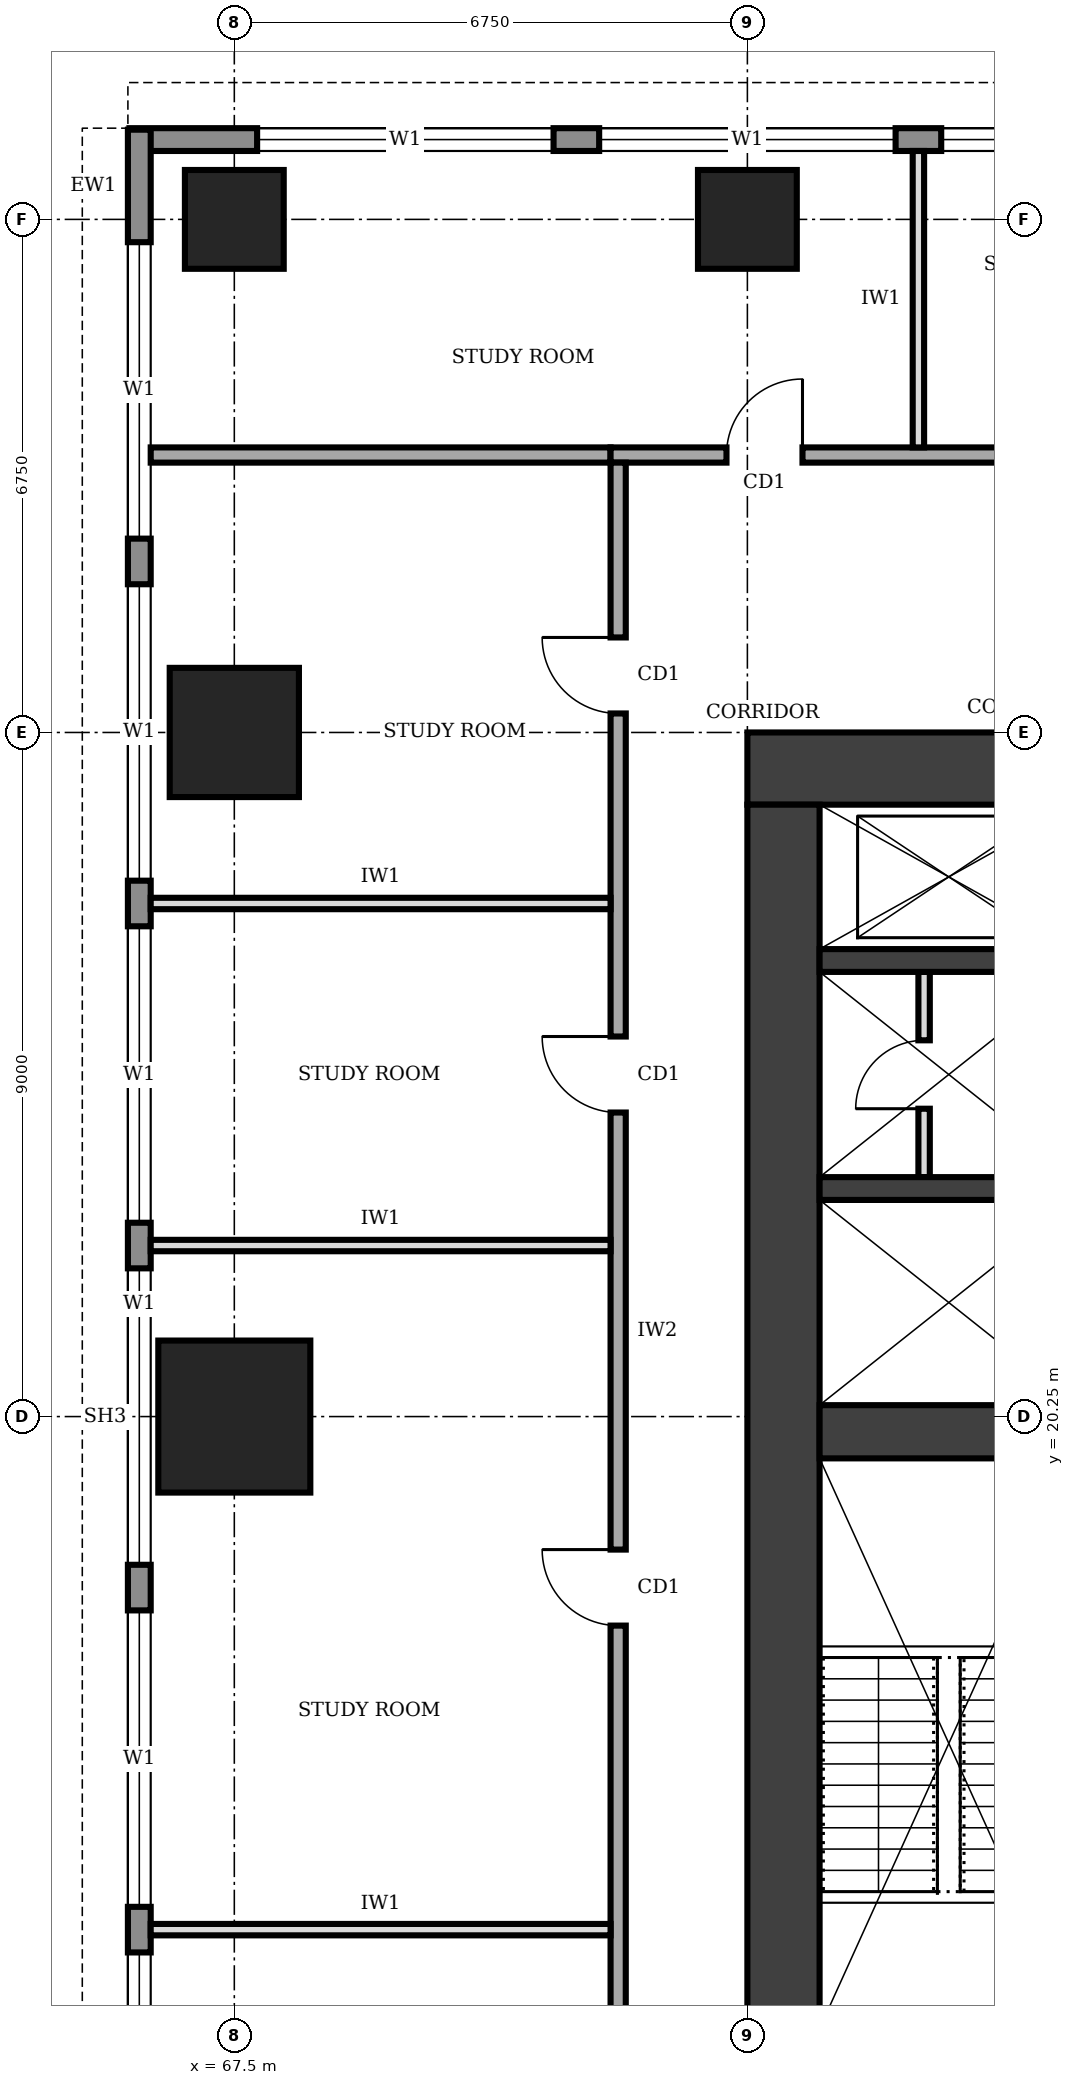
"""IFC4 building model, lengths in metres.
Left out: names, types, materials, properties, quantities, classifications, styles, units other than length and angle.
Written with IfcOpenShell. Run it as: python <this file> out.ifc"""

import sys

from ifc_helpers import new_model, si_unit, direction, frame, frame_2d, origin, origin_2d, place, context, subcontext, project, spatial, rectangle, extrude, element, fill, save


model = new_model("IFC4")
c1 = context("Model", 3, precision=1e-05, world=origin(), true_north=direction((0.0, 1.0)))
c2 = subcontext(c1, "Body", "Model", "MODEL_VIEW")
j1 = project(units=[si_unit("LENGTHUNIT", "METRE"), si_unit("PLANEANGLEUNIT", "RADIAN")], contexts=[c1])
p1 = place(None, origin())
s1 = spatial("IfcSite", under=j1, at=p1, CompositionType="ELEMENT")
p2 = place(p1, origin())
s2 = spatial("IfcBuilding", under=s1, at=p2, CompositionType="ELEMENT")
p3 = place(p2, frame((0.0, 0.0, 225.0)))
s3 = spatial("IfcBuildingStorey", under=s2, at=p3, CompositionType="ELEMENT", Elevation=225.0)
p4 = place(p3, frame((87.75, 28.775, 0.0), z_axis=(0.0, 0.0, 1.0), x_axis=(-1.0, 0.0, 0.0)))
e1 = element("IfcWall", 1, at=p4, inside=s3, PredefinedType="SHEAR", context=c2, shape_type="SweptSolid", body=[
    extrude(rectangle(XDim=13.5, YDim=0.95, at=frame_2d((6.75, 0.0))), origin(), (0.0, 0.0, 1.0), 4.0),
])
p5 = place(p4, frame((4.75, 0.0, 0.0)))
e2 = element("IfcOpeningElement", 2, at=p5, cuts=e1, PredefinedType="OPENING", context=c2, shape_type="SweptSolid", body=[
    extrude(rectangle(XDim=1.8, YDim=2.1, at=frame_2d((0.9, 1.05))), frame((0.0, 0.485, 0.0), z_axis=(0.0, -1.0, 0.0), x_axis=(1.0, 0.0, 0.0)), (0.0, 0.0, 1.0), 0.97),
])
p6 = place(p3, frame((74.725, 28.3, 0.0), z_axis=(0.0, 0.0, 1.0), x_axis=(0.0, -1.0, 0.0)))
e3 = element("IfcWall", 3, at=p6, inside=s3, PredefinedType="SHEAR", context=c2, shape_type="SweptSolid", body=[
    extrude(rectangle(XDim=16.1, YDim=0.95, at=frame_2d((8.05, 0.0))), origin(), (0.0, 0.0, 1.0), 4.0),
])
p7 = place(p3, frame((75.2, 20.05, 0.0), z_axis=(0.0, 0.0, 1.0), x_axis=(1.0, 0.0, 0.0)))
e4 = element("IfcWall", 4, at=p7, inside=s3, PredefinedType="SHEAR", context=c2, shape_type="SweptSolid", body=[
    extrude(rectangle(XDim=3.4, YDim=0.7, at=frame_2d((1.7, 0.0))), origin(), (0.0, 0.0, 1.0), 4.0),
])
for number, where, z_axis, x_axis in (
    (5, (75.2, 23.25, 0.0), (0.0, 0.0, 1.0), (1.0, 0.0, 0.0)),
    (6, (75.2, 26.25, 0.0), (0.0, 0.0, 1.0), (1.0, 0.0, 0.0)),
):
    element("IfcWall", number, at=place(p3, frame(where, z_axis=z_axis, x_axis=x_axis)), inside=s3, PredefinedType="SHEAR", context=c2, shape_type="SweptSolid", body=[
        extrude(rectangle(XDim=3.4, YDim=0.3, at=frame_2d((1.7, 0.0))), origin(), (0.0, 0.0, 1.0), 4.0),
    ])
p8 = place(p3, frame((67.5, 20.25, 0.0), z_axis=(0.0, 0.0, 1.0), x_axis=(1.0, 0.0, 0.0)))
e7 = element("IfcColumn", 7, at=p8, inside=s3, PredefinedType="COLUMN", context=c2, shape_type="SweptSolid", body=[
    extrude(rectangle(XDim=2.0, YDim=2.0, at=origin_2d()), origin(), (0.0, 0.0, 1.0), 4.0),
])
p9 = place(p3, frame((67.5, 29.25, 0.0), z_axis=(0.0, 0.0, 1.0), x_axis=(1.0, 0.0, 0.0)))
e8 = element("IfcColumn", 8, at=p9, inside=s3, PredefinedType="COLUMN", context=c2, shape_type="SweptSolid", body=[
    extrude(rectangle(XDim=1.7, YDim=1.7, at=origin_2d()), origin(), (0.0, 0.0, 1.0), 4.0),
])
for number, where, z_axis, x_axis in (
    (9, (67.5, 36.0, 0.0), (0.0, 0.0, 1.0), (1.0, 0.0, 0.0)),
    (10, (74.25, 36.0, 0.0), (0.0, 0.0, 1.0), (1.0, 0.0, 0.0)),
):
    element("IfcColumn", number, at=place(p3, frame(where, z_axis=z_axis, x_axis=x_axis)), inside=s3, PredefinedType="COLUMN", context=c2, shape_type="SweptSolid", body=[
        extrude(rectangle(XDim=1.3, YDim=1.3, at=origin_2d()), origin(), (0.0, 0.0, 1.0), 4.0),
    ])
p10 = place(p3, frame((96.03, 37.05, 0.0), z_axis=(0.0, 0.0, 1.0), x_axis=(-1.0, 0.0, 0.0)))
e11 = element("IfcWall", 11, at=p10, inside=s3, PredefinedType="STANDARD", context=c2, shape_type="SweptSolid", body=[
    extrude(rectangle(XDim=29.91, YDim=0.3, at=frame_2d((14.955, 0.0))), origin(), (0.0, 0.0, 1.0), 3.75),
])
p11 = place(p10, frame((24.33, 0.0, 0.9)))
e12 = element("IfcOpeningElement", 12, at=p11, cuts=e11, PredefinedType="OPENING", context=c2, shape_type="SweptSolid", body=[
    extrude(rectangle(XDim=3.9, YDim=2.2, at=frame_2d((1.95, 1.1))), frame((0.0, 0.16, 0.0), z_axis=(0.0, -1.0, 0.0), x_axis=(1.0, 0.0, 0.0)), (0.0, 0.0, 1.0), 0.32),
])
p12 = place(p10, frame((19.83, 0.0, 0.9)))
e13 = element("IfcOpeningElement", 13, at=p12, cuts=e11, PredefinedType="OPENING", context=c2, shape_type="SweptSolid", body=[
    extrude(rectangle(XDim=3.9, YDim=2.2, at=frame_2d((1.95, 1.1))), frame((0.0, 0.16, 0.0), z_axis=(0.0, -1.0, 0.0), x_axis=(1.0, 0.0, 0.0)), (0.0, 0.0, 1.0), 0.32),
])
p13 = place(p10, frame((15.33, 0.0, 0.9)))
e14 = element("IfcOpeningElement", 14, at=p13, cuts=e11, PredefinedType="OPENING", context=c2, shape_type="SweptSolid", body=[
    extrude(rectangle(XDim=3.9, YDim=2.2, at=frame_2d((1.95, 1.1))), frame((0.0, 0.16, 0.0), z_axis=(0.0, -1.0, 0.0), x_axis=(1.0, 0.0, 0.0)), (0.0, 0.0, 1.0), 0.32),
])
p14 = place(p10, frame((10.83, 0.0, 0.9)))
e15 = element("IfcOpeningElement", 15, at=p14, cuts=e11, PredefinedType="OPENING", context=c2, shape_type="SweptSolid", body=[
    extrude(rectangle(XDim=3.9, YDim=2.2, at=frame_2d((1.95, 1.1))), frame((0.0, 0.16, 0.0), z_axis=(0.0, -1.0, 0.0), x_axis=(1.0, 0.0, 0.0)), (0.0, 0.0, 1.0), 0.32),
])
p15 = place(p10, frame((6.33, 0.0, 0.9)))
e16 = element("IfcOpeningElement", 16, at=p15, cuts=e11, PredefinedType="OPENING", context=c2, shape_type="SweptSolid", body=[
    extrude(rectangle(XDim=3.9, YDim=2.2, at=frame_2d((1.95, 1.1))), frame((0.0, 0.16, 0.0), z_axis=(0.0, -1.0, 0.0), x_axis=(1.0, 0.0, 0.0)), (0.0, 0.0, 1.0), 0.32),
])
p16 = place(p10, frame((1.83, 0.0, 0.9)))
e17 = element("IfcOpeningElement", 17, at=p16, cuts=e11, PredefinedType="OPENING", context=c2, shape_type="SweptSolid", body=[
    extrude(rectangle(XDim=3.9, YDim=2.2, at=frame_2d((1.95, 1.1))), frame((0.0, 0.16, 0.0), z_axis=(0.0, -1.0, 0.0), x_axis=(1.0, 0.0, 0.0)), (0.0, 0.0, 1.0), 0.32),
])
p17 = place(p3, frame((66.25, 37.18, 0.0), z_axis=(0.0, 0.0, 1.0), x_axis=(0.0, -1.0, 0.0)))
e18 = element("IfcWall", 18, at=p17, inside=s3, PredefinedType="STANDARD", context=c2, shape_type="SweptSolid", body=[
    extrude(rectangle(XDim=33.86, YDim=0.3, at=frame_2d((16.93, 0.0))), origin(), (0.0, 0.0, 1.0), 3.75),
])
p18 = place(p17, frame((28.48, 0.0, 0.9)))
e19 = element("IfcOpeningElement", 19, at=p18, cuts=e18, PredefinedType="OPENING", context=c2, shape_type="SweptSolid", body=[
    extrude(rectangle(XDim=3.9, YDim=2.2, at=frame_2d((1.95, 1.1))), frame((0.0, 0.16, 0.0), z_axis=(0.0, -1.0, 0.0), x_axis=(1.0, 0.0, 0.0)), (0.0, 0.0, 1.0), 0.32),
])
p19 = place(p17, frame((23.98, 0.0, 0.9)))
e20 = element("IfcOpeningElement", 20, at=p19, cuts=e18, PredefinedType="OPENING", context=c2, shape_type="SweptSolid", body=[
    extrude(rectangle(XDim=3.9, YDim=2.2, at=frame_2d((1.95, 1.1))), frame((0.0, 0.16, 0.0), z_axis=(0.0, -1.0, 0.0), x_axis=(1.0, 0.0, 0.0)), (0.0, 0.0, 1.0), 0.32),
])
p20 = place(p17, frame((19.48, 0.0, 0.9)))
e21 = element("IfcOpeningElement", 21, at=p20, cuts=e18, PredefinedType="OPENING", context=c2, shape_type="SweptSolid", body=[
    extrude(rectangle(XDim=3.9, YDim=2.2, at=frame_2d((1.95, 1.1))), frame((0.0, 0.16, 0.0), z_axis=(0.0, -1.0, 0.0), x_axis=(1.0, 0.0, 0.0)), (0.0, 0.0, 1.0), 0.32),
])
p21 = place(p17, frame((14.98, 0.0, 0.9)))
e22 = element("IfcOpeningElement", 22, at=p21, cuts=e18, PredefinedType="OPENING", context=c2, shape_type="SweptSolid", body=[
    extrude(rectangle(XDim=3.9, YDim=2.2, at=frame_2d((1.95, 1.1))), frame((0.0, 0.16, 0.0), z_axis=(0.0, -1.0, 0.0), x_axis=(1.0, 0.0, 0.0)), (0.0, 0.0, 1.0), 0.32),
])
p22 = place(p17, frame((10.48, 0.0, 0.9)))
e23 = element("IfcOpeningElement", 23, at=p22, cuts=e18, PredefinedType="OPENING", context=c2, shape_type="SweptSolid", body=[
    extrude(rectangle(XDim=3.9, YDim=2.2, at=frame_2d((1.95, 1.1))), frame((0.0, 0.16, 0.0), z_axis=(0.0, -1.0, 0.0), x_axis=(1.0, 0.0, 0.0)), (0.0, 0.0, 1.0), 0.32),
])
p23 = place(p17, frame((5.98, 0.0, 0.9)))
e24 = element("IfcOpeningElement", 24, at=p23, cuts=e18, PredefinedType="OPENING", context=c2, shape_type="SweptSolid", body=[
    extrude(rectangle(XDim=3.9, YDim=2.2, at=frame_2d((1.95, 1.1))), frame((0.0, 0.16, 0.0), z_axis=(0.0, -1.0, 0.0), x_axis=(1.0, 0.0, 0.0)), (0.0, 0.0, 1.0), 0.32),
])
p24 = place(p17, frame((1.48, 0.0, 0.9)))
e25 = element("IfcOpeningElement", 25, at=p24, cuts=e18, PredefinedType="OPENING", context=c2, shape_type="SweptSolid", body=[
    extrude(rectangle(XDim=3.9, YDim=2.2, at=frame_2d((1.95, 1.1))), frame((0.0, 0.16, 0.0), z_axis=(0.0, -1.0, 0.0), x_axis=(1.0, 0.0, 0.0)), (0.0, 0.0, 1.0), 0.32),
])
p25 = place(p3, frame((76.575, 23.4, 0.0), z_axis=(0.0, 0.0, 1.0), x_axis=(0.0, 1.0, 0.0)))
e26 = element("IfcWall", 26, at=p25, inside=s3, PredefinedType="PARTITIONING", context=c2, shape_type="SweptSolid", body=[
    extrude(rectangle(XDim=2.7, YDim=0.15, at=frame_2d((1.35, 0.0))), origin(), (0.0, 0.0, 1.0), 3.75),
])
p26 = place(p25, frame((0.9, 0.0, 0.0)))
e27 = element("IfcOpeningElement", 27, at=p26, cuts=e26, PredefinedType="OPENING", context=c2, shape_type="SweptSolid", body=[
    extrude(rectangle(XDim=0.9, YDim=2.1, at=frame_2d((0.45, 1.05))), frame((0.0, 0.085, 0.0), z_axis=(0.0, -1.0, 0.0), x_axis=(1.0, 0.0, 0.0)), (0.0, 0.0, 1.0), 0.17),
])
p27 = place(p3, frame((89.35, 32.9, 0.0), z_axis=(0.0, 0.0, 1.0), x_axis=(-1.0, 0.0, 0.0)))
e28 = element("IfcWall", 28, at=p27, inside=s3, PredefinedType="SOLIDWALL", context=c2, shape_type="SweptSolid", body=[
    extrude(rectangle(XDim=16.9, YDim=0.2, at=frame_2d((8.45, 0.0))), origin(), (0.0, 0.0, 1.0), 3.75),
])
p28 = place(p27, frame((14.375, 0.0, 0.0)))
e29 = element("IfcOpeningElement", 29, at=p28, cuts=e28, PredefinedType="OPENING", context=c2, shape_type="SweptSolid", body=[
    extrude(rectangle(XDim=1.0, YDim=2.1, at=frame_2d((0.5, 1.05))), frame((0.0, 0.11, 0.0), z_axis=(0.0, -1.0, 0.0), x_axis=(1.0, 0.0, 0.0)), (0.0, 0.0, 1.0), 0.22),
])
p29 = place(p27, frame((1.325, 0.0, 0.0)))
e30 = element("IfcOpeningElement", 30, at=p29, cuts=e28, PredefinedType="OPENING", context=c2, shape_type="SweptSolid", body=[
    extrude(rectangle(XDim=1.0, YDim=2.1, at=frame_2d((0.5, 1.05))), frame((0.0, 0.11, 0.0), z_axis=(0.0, -1.0, 0.0), x_axis=(1.0, 0.0, 0.0)), (0.0, 0.0, 1.0), 0.22),
])
p30 = place(p3, frame((72.55, 32.8, 0.0), z_axis=(0.0, 0.0, 1.0), x_axis=(0.0, -1.0, 0.0)))
e31 = element("IfcWall", 31, at=p30, inside=s3, PredefinedType="SOLIDWALL", context=c2, shape_type="SweptSolid", body=[
    extrude(rectangle(XDim=23.8, YDim=0.2, at=frame_2d((11.9, 0.0))), origin(), (0.0, 0.0, 1.0), 3.75),
])
p31 = place(p30, frame((21.05, 0.0, 0.0)))
e32 = element("IfcOpeningElement", 32, at=p31, cuts=e31, PredefinedType="OPENING", context=c2, shape_type="SweptSolid", body=[
    extrude(rectangle(XDim=1.0, YDim=2.1, at=frame_2d((0.5, 1.05))), frame((0.0, 0.11, 0.0), z_axis=(0.0, -1.0, 0.0), x_axis=(1.0, 0.0, 0.0)), (0.0, 0.0, 1.0), 0.22),
])
p32 = place(p30, frame((14.3, 0.0, 0.0)))
e33 = element("IfcOpeningElement", 33, at=p32, cuts=e31, PredefinedType="OPENING", context=c2, shape_type="SweptSolid", body=[
    extrude(rectangle(XDim=1.0, YDim=2.1, at=frame_2d((0.5, 1.05))), frame((0.0, 0.11, 0.0), z_axis=(0.0, -1.0, 0.0), x_axis=(1.0, 0.0, 0.0)), (0.0, 0.0, 1.0), 0.22),
])
p33 = place(p30, frame((7.55, 0.0, 0.0)))
e34 = element("IfcOpeningElement", 34, at=p33, cuts=e31, PredefinedType="OPENING", context=c2, shape_type="SweptSolid", body=[
    extrude(rectangle(XDim=1.0, YDim=2.1, at=frame_2d((0.5, 1.05))), frame((0.0, 0.11, 0.0), z_axis=(0.0, -1.0, 0.0), x_axis=(1.0, 0.0, 0.0)), (0.0, 0.0, 1.0), 0.22),
])
p34 = place(p30, frame((2.3, 0.0, 0.0)))
e35 = element("IfcOpeningElement", 35, at=p34, cuts=e31, PredefinedType="OPENING", context=c2, shape_type="SweptSolid", body=[
    extrude(rectangle(XDim=1.0, YDim=2.1, at=frame_2d((0.5, 1.05))), frame((0.0, 0.11, 0.0), z_axis=(0.0, -1.0, 0.0), x_axis=(1.0, 0.0, 0.0)), (0.0, 0.0, 1.0), 0.22),
])
p35 = place(p3, frame((66.4, 32.9, 0.0), z_axis=(0.0, 0.0, 1.0), x_axis=(1.0, 0.0, 0.0)))
e36 = element("IfcWall", 36, at=p35, inside=s3, PredefinedType="SOLIDWALL", context=c2, shape_type="SweptSolid", body=[
    extrude(rectangle(XDim=6.05, YDim=0.2, at=frame_2d((3.025, 0.0))), origin(), (0.0, 0.0, 1.0), 3.75),
])
p36 = place(p3, frame((76.5, 33.0, 0.0), z_axis=(0.0, 0.0, 1.0), x_axis=(0.0, 1.0, 0.0)))
e37 = element("IfcWall", 37, at=p36, inside=s3, PredefinedType="PARTITIONING", context=c2, shape_type="SweptSolid", body=[
    extrude(rectangle(XDim=3.9, YDim=0.15, at=frame_2d((1.95, 0.0))), origin(), (0.0, 0.0, 1.0), 3.75),
])
for number, where, z_axis, x_axis in (
    (38, (66.4, 13.5, 0.0), (0.0, 0.0, 1.0), (1.0, 0.0, 0.0)),
    (39, (66.4, 22.5, 0.0), (0.0, 0.0, 1.0), (1.0, 0.0, 0.0)),
    (40, (66.4, 27.0, 0.0), (0.0, 0.0, 1.0), (1.0, 0.0, 0.0)),
):
    element("IfcWall", number, at=place(p3, frame(where, z_axis=z_axis, x_axis=x_axis)), inside=s3, PredefinedType="PARTITIONING", context=c2, shape_type="SweptSolid", body=[
        extrude(rectangle(XDim=6.05, YDim=0.15, at=frame_2d((3.025, 0.0))), origin(), (0.0, 0.0, 1.0), 3.75),
    ])
p37 = place(p11, origin())
e41 = element("IfcWindow", 41, at=p37, inside=s3, PartitioningType="SINGLE_PANEL", PredefinedType="WINDOW", context=c2, shape_type="SweptSolid", body=[
    extrude(rectangle(XDim=3.9, YDim=2.2, at=frame_2d((1.95, 1.1))), frame((0.0, 0.03, 0.0), z_axis=(0.0, -1.0, 0.0), x_axis=(1.0, 0.0, 0.0)), (0.0, 0.0, 1.0), 0.06),
])
fill(e12, e41)
p38 = place(p12, origin())
e42 = element("IfcWindow", 42, at=p38, inside=s3, PartitioningType="SINGLE_PANEL", PredefinedType="WINDOW", context=c2, shape_type="SweptSolid", body=[
    extrude(rectangle(XDim=3.9, YDim=2.2, at=frame_2d((1.95, 1.1))), frame((0.0, 0.03, 0.0), z_axis=(0.0, -1.0, 0.0), x_axis=(1.0, 0.0, 0.0)), (0.0, 0.0, 1.0), 0.06),
])
fill(e13, e42)
p39 = place(p13, origin())
e43 = element("IfcWindow", 43, at=p39, inside=s3, PartitioningType="SINGLE_PANEL", PredefinedType="WINDOW", context=c2, shape_type="SweptSolid", body=[
    extrude(rectangle(XDim=3.9, YDim=2.2, at=frame_2d((1.95, 1.1))), frame((0.0, 0.03, 0.0), z_axis=(0.0, -1.0, 0.0), x_axis=(1.0, 0.0, 0.0)), (0.0, 0.0, 1.0), 0.06),
])
fill(e14, e43)
p40 = place(p19, origin())
e44 = element("IfcWindow", 44, at=p40, inside=s3, PartitioningType="SINGLE_PANEL", PredefinedType="WINDOW", context=c2, shape_type="SweptSolid", body=[
    extrude(rectangle(XDim=3.9, YDim=2.2, at=frame_2d((1.95, 1.1))), frame((0.0, 0.03, 0.0), z_axis=(0.0, -1.0, 0.0), x_axis=(1.0, 0.0, 0.0)), (0.0, 0.0, 1.0), 0.06),
])
fill(e20, e44)
p41 = place(p20, origin())
e45 = element("IfcWindow", 45, at=p41, inside=s3, PartitioningType="SINGLE_PANEL", PredefinedType="WINDOW", context=c2, shape_type="SweptSolid", body=[
    extrude(rectangle(XDim=3.9, YDim=2.2, at=frame_2d((1.95, 1.1))), frame((0.0, 0.03, 0.0), z_axis=(0.0, -1.0, 0.0), x_axis=(1.0, 0.0, 0.0)), (0.0, 0.0, 1.0), 0.06),
])
fill(e21, e45)
p42 = place(p21, origin())
e46 = element("IfcWindow", 46, at=p42, inside=s3, PartitioningType="SINGLE_PANEL", PredefinedType="WINDOW", context=c2, shape_type="SweptSolid", body=[
    extrude(rectangle(XDim=3.9, YDim=2.2, at=frame_2d((1.95, 1.1))), frame((0.0, 0.03, 0.0), z_axis=(0.0, -1.0, 0.0), x_axis=(1.0, 0.0, 0.0)), (0.0, 0.0, 1.0), 0.06),
])
fill(e22, e46)
p43 = place(p22, origin())
e47 = element("IfcWindow", 47, at=p43, inside=s3, PartitioningType="SINGLE_PANEL", PredefinedType="WINDOW", context=c2, shape_type="SweptSolid", body=[
    extrude(rectangle(XDim=3.9, YDim=2.2, at=frame_2d((1.95, 1.1))), frame((0.0, 0.03, 0.0), z_axis=(0.0, -1.0, 0.0), x_axis=(1.0, 0.0, 0.0)), (0.0, 0.0, 1.0), 0.06),
])
fill(e23, e47)
p44 = place(p23, origin())
e48 = element("IfcWindow", 48, at=p44, inside=s3, PartitioningType="SINGLE_PANEL", PredefinedType="WINDOW", context=c2, shape_type="SweptSolid", body=[
    extrude(rectangle(XDim=3.9, YDim=2.2, at=frame_2d((1.95, 1.1))), frame((0.0, 0.03, 0.0), z_axis=(0.0, -1.0, 0.0), x_axis=(1.0, 0.0, 0.0)), (0.0, 0.0, 1.0), 0.06),
])
fill(e24, e48)
p45 = place(p24, origin())
e49 = element("IfcWindow", 49, at=p45, inside=s3, PartitioningType="SINGLE_PANEL", PredefinedType="WINDOW", context=c2, shape_type="SweptSolid", body=[
    extrude(rectangle(XDim=3.9, YDim=2.2, at=frame_2d((1.95, 1.1))), frame((0.0, 0.03, 0.0), z_axis=(0.0, -1.0, 0.0), x_axis=(1.0, 0.0, 0.0)), (0.0, 0.0, 1.0), 0.06),
])
fill(e25, e49)
p46 = place(p26, origin())
e50 = element("IfcDoor", 50, at=p46, inside=s3, OperationType="SINGLE_SWING_LEFT", PredefinedType="DOOR", context=c2, shape_type="SweptSolid", body=[
    extrude(rectangle(XDim=0.9, YDim=2.1, at=frame_2d((0.45, 1.05))), frame((0.0, 0.025, 0.0), z_axis=(0.0, -1.0, 0.0), x_axis=(1.0, 0.0, 0.0)), (0.0, 0.0, 1.0), 0.05),
])
fill(e27, e50)
p47 = place(p28, frame((1.0, 0.0, 0.0), z_axis=(0.0, 0.0, 1.0), x_axis=(-1.0, 0.0, 0.0)))
e51 = element("IfcDoor", 51, at=p47, inside=s3, OperationType="SINGLE_SWING_RIGHT", PredefinedType="DOOR", context=c2, shape_type="SweptSolid", body=[
    extrude(rectangle(XDim=1.0, YDim=2.1, at=frame_2d((0.5, 1.05))), frame((0.0, 0.025, 0.0), z_axis=(0.0, -1.0, 0.0), x_axis=(1.0, 0.0, 0.0)), (0.0, 0.0, 1.0), 0.05),
])
fill(e29, e51)
p48 = place(p32, frame((1.0, 0.0, 0.0), z_axis=(0.0, 0.0, 1.0), x_axis=(-1.0, 0.0, 0.0)))
e52 = element("IfcDoor", 52, at=p48, inside=s3, OperationType="SINGLE_SWING_RIGHT", PredefinedType="DOOR", context=c2, shape_type="SweptSolid", body=[
    extrude(rectangle(XDim=1.0, YDim=2.1, at=frame_2d((0.5, 1.05))), frame((0.0, 0.025, 0.0), z_axis=(0.0, -1.0, 0.0), x_axis=(1.0, 0.0, 0.0)), (0.0, 0.0, 1.0), 0.05),
])
fill(e33, e52)
p49 = place(p33, frame((1.0, 0.0, 0.0), z_axis=(0.0, 0.0, 1.0), x_axis=(-1.0, 0.0, 0.0)))
e53 = element("IfcDoor", 53, at=p49, inside=s3, OperationType="SINGLE_SWING_RIGHT", PredefinedType="DOOR", context=c2, shape_type="SweptSolid", body=[
    extrude(rectangle(XDim=1.0, YDim=2.1, at=frame_2d((0.5, 1.05))), frame((0.0, 0.025, 0.0), z_axis=(0.0, -1.0, 0.0), x_axis=(1.0, 0.0, 0.0)), (0.0, 0.0, 1.0), 0.05),
])
fill(e34, e53)
p50 = place(p34, frame((1.0, 0.0, 0.0), z_axis=(0.0, 0.0, 1.0), x_axis=(-1.0, 0.0, 0.0)))
e54 = element("IfcDoor", 54, at=p50, inside=s3, OperationType="SINGLE_SWING_RIGHT", PredefinedType="DOOR", context=c2, shape_type="SweptSolid", body=[
    extrude(rectangle(XDim=1.0, YDim=2.1, at=frame_2d((0.5, 1.05))), frame((0.0, 0.025, 0.0), z_axis=(0.0, -1.0, 0.0), x_axis=(1.0, 0.0, 0.0)), (0.0, 0.0, 1.0), 0.05),
])
fill(e35, e54)
save(model, sys.argv[1])
